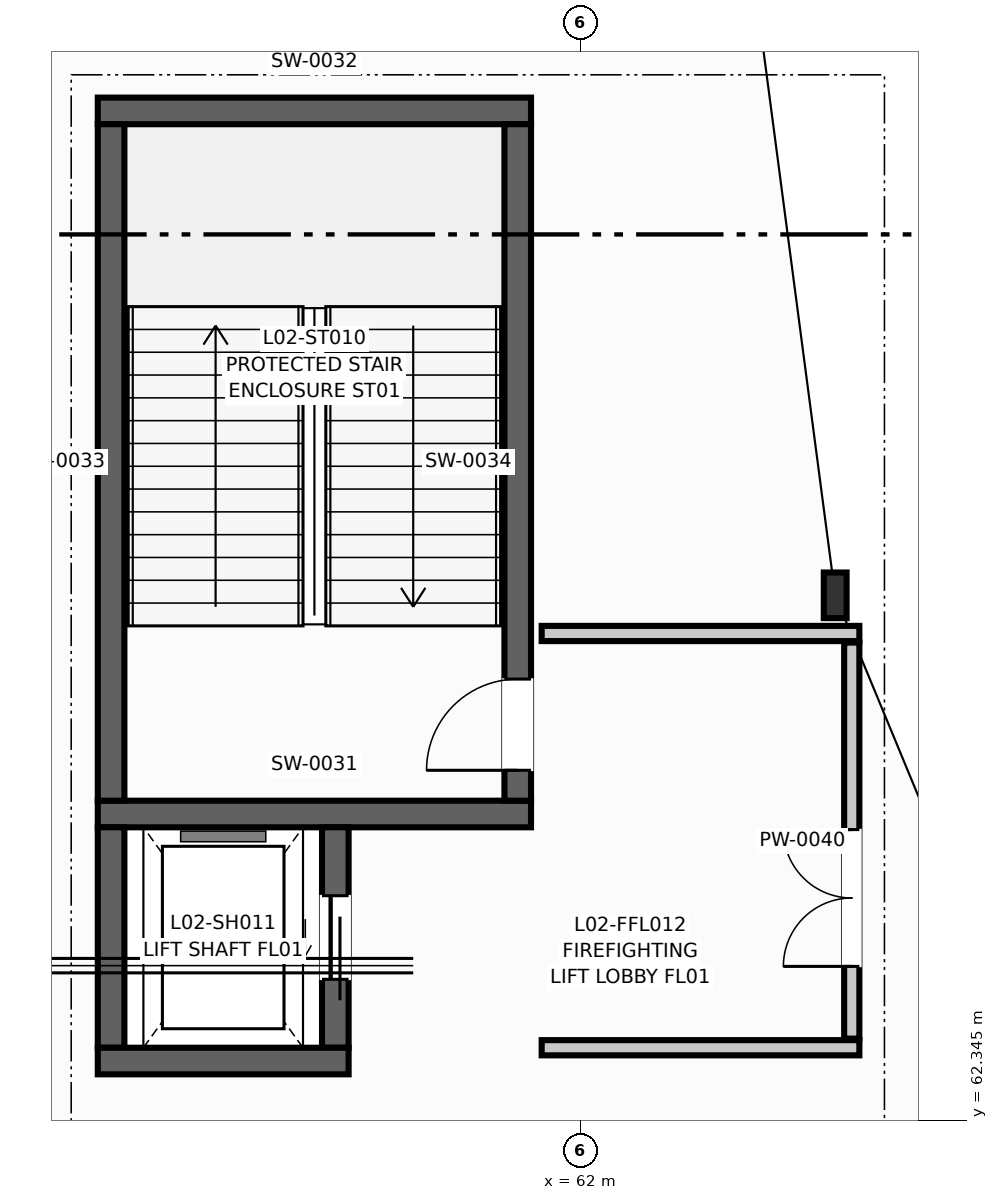
"""IFC4 building model, lengths in metres.
Left out: names, types, materials, properties, quantities, classifications, styles, units other than length and angle.
Written with IfcOpenShell. Run it as: python <this file> out.ifc"""

import sys

from ifc_helpers import new_model, si_unit, direction, frame, frame_2d, origin, origin_2d, place, context, subcontext, project, spatial, rectangle, i_section, extrude, element, fill, save


model = new_model("IFC4")
c1 = context("Model", 3, precision=1e-05, world=origin(), true_north=direction((0.0, 1.0)))
c2 = subcontext(c1, "Body", "Model", "MODEL_VIEW")
j1 = project(units=[si_unit("LENGTHUNIT", "METRE"), si_unit("PLANEANGLEUNIT", "RADIAN")], contexts=[c1])
p1 = place(None, origin())
s1 = spatial("IfcSite", under=j1, at=p1, CompositionType="ELEMENT")
p2 = place(p1, origin())
s2 = spatial("IfcBuilding", under=s1, at=p2, CompositionType="ELEMENT")
p3 = place(p2, frame((0.0, 0.0, 9.0)))
s3 = spatial("IfcBuildingStorey", under=s2, at=p3, CompositionType="ELEMENT", Elevation=9.0)
p4 = place(p3, frame((65.352, 69.252, 0.0), z_axis=(0.0, 0.0, 1.0), x_axis=(1.0, 0.0, 0.0)))
e1 = element("IfcColumn", 1, at=p4, inside=s3, PredefinedType="COLUMN", context=c2, shape_type="SweptSolid", body=[
    extrude(i_section(OverallWidth=0.3, OverallDepth=0.6, WebThickness=0.015, FlangeThickness=0.03, at=origin_2d()), origin(), (0.0, 0.0, 1.0), 4.5),
])
p5 = place(p3, frame((51.201, 65.46, 0.0), z_axis=(0.0, 0.0, 1.0), x_axis=(0.382681957383, -0.923880143468, 0.0)))
e2 = element("IfcWall", 2, at=p5, inside=s3, PredefinedType="SOLIDWALL", context=c2, shape_type="SweptSolid", body=[
    extrude(rectangle(XDim=12.648, YDim=0.28, at=frame_2d((6.324, 0.0))), origin(), (0.0, 0.0, 1.0), 3.1),
])
p6 = place(p5, frame((5.424, 0.0, 0.0)))
e3 = element("IfcOpeningElement", 3, at=p6, cuts=e2, PredefinedType="OPENING", context=c2, shape_type="SweptSolid", body=[
    extrude(rectangle(XDim=1.8, YDim=2.35, at=frame_2d((0.9, 1.175))), frame((0.0, 0.15, 0.0), z_axis=(0.0, -1.0, 0.0), x_axis=(1.0, 0.0, 0.0)), (0.0, 0.0, 1.0), 0.3),
])
for number, where, z_axis, x_axis in (
    (4, (55.65, 66.375, 0.0), (0.0, 0.0, 1.0), (1.0, 0.0, 0.0)),
    (5, (55.65, 75.625, 0.0), (0.0, 0.0, 1.0), (1.0, 0.0, 0.0)),
):
    element("IfcWall", number, at=place(p3, frame(where, z_axis=z_axis, x_axis=x_axis)), inside=s3, PredefinedType="SHEAR", context=c2, shape_type="SweptSolid", body=[
        extrude(rectangle(XDim=5.7, YDim=0.35, at=frame_2d((2.85, 0.0))), origin(), (0.0, 0.0, 1.0), 4.25),
    ])
p7 = place(p3, frame((55.825, 66.55, 0.0), z_axis=(0.0, 0.0, 1.0), x_axis=(0.0, 1.0, 0.0)))
e6 = element("IfcWall", 6, at=p7, inside=s3, PredefinedType="SHEAR", context=c2, shape_type="SweptSolid", body=[
    extrude(rectangle(XDim=8.9, YDim=0.35, at=frame_2d((4.45, 0.0))), origin(), (0.0, 0.0, 1.0), 4.25),
])
p8 = place(p3, frame((61.175, 66.55, 0.0), z_axis=(0.0, 0.0, 1.0), x_axis=(0.0, 1.0, 0.0)))
e7 = element("IfcWall", 7, at=p8, inside=s3, PredefinedType="SHEAR", context=c2, shape_type="SweptSolid", body=[
    extrude(rectangle(XDim=8.9, YDim=0.35, at=frame_2d((4.45, 0.0))), origin(), (0.0, 0.0, 1.0), 4.25),
])
p9 = place(p8, frame((0.4, 0.0, 0.0)))
e8 = element("IfcOpeningElement", 8, at=p9, cuts=e7, PredefinedType="OPENING", context=c2, shape_type="SweptSolid", body=[
    extrude(rectangle(XDim=1.2, YDim=2.2, at=frame_2d((0.6, 1.1))), frame((0.0, 0.185, 0.0), z_axis=(0.0, -1.0, 0.0), x_axis=(1.0, 0.0, 0.0)), (0.0, 0.0, 1.0), 0.37),
])
p10 = place(p3, frame((55.825, 63.3, 0.0), z_axis=(0.0, 0.0, 1.0), x_axis=(0.0, 1.0, 0.0)))
e9 = element("IfcWall", 9, at=p10, inside=s3, PredefinedType="SHEAR", context=c2, shape_type="SweptSolid", body=[
    extrude(rectangle(XDim=2.9, YDim=0.35, at=frame_2d((1.45, 0.0))), origin(), (0.0, 0.0, 1.0), 4.25),
])
p11 = place(p3, frame((58.775, 63.3, 0.0), z_axis=(0.0, 0.0, 1.0), x_axis=(0.0, 1.0, 0.0)))
e10 = element("IfcWall", 10, at=p11, inside=s3, PredefinedType="SHEAR", context=c2, shape_type="SweptSolid", body=[
    extrude(rectangle(XDim=2.9, YDim=0.35, at=frame_2d((1.45, 0.0))), origin(), (0.0, 0.0, 1.0), 4.25),
])
p12 = place(p11, frame((0.9, 0.0, 0.0)))
e11 = element("IfcOpeningElement", 11, at=p12, cuts=e10, PredefinedType="OPENING", context=c2, shape_type="SweptSolid", body=[
    extrude(rectangle(XDim=1.1, YDim=2.2, at=frame_2d((0.55, 1.1))), frame((0.0, 0.185, 0.0), z_axis=(0.0, -1.0, 0.0), x_axis=(1.0, 0.0, 0.0)), (0.0, 0.0, 1.0), 0.37),
])
p13 = place(p3, frame((55.65, 63.125, 0.0), z_axis=(0.0, 0.0, 1.0), x_axis=(1.0, 0.0, 0.0)))
e12 = element("IfcWall", 12, at=p13, inside=s3, PredefinedType="SHEAR", context=c2, shape_type="SweptSolid", body=[
    extrude(rectangle(XDim=3.3, YDim=0.35, at=frame_2d((1.65, 0.0))), origin(), (0.0, 0.0, 1.0), 4.25),
])
for number, where, z_axis, x_axis in (
    (13, (61.49, 63.3, 0.0), (0.0, 0.0, 1.0), (1.0, 0.0, 0.0)),
    (14, (61.49, 68.75, 0.0), (0.0, 0.0, 1.0), (1.0, 0.0, 0.0)),
):
    element("IfcWall", number, at=place(p3, frame(where, z_axis=z_axis, x_axis=x_axis)), inside=s3, PredefinedType="PARTITIONING", context=c2, shape_type="SweptSolid", body=[
        extrude(rectangle(XDim=4.18, YDim=0.2, at=frame_2d((2.09, 0.0))), origin(), (0.0, 0.0, 1.0), 3.22),
    ])
p14 = place(p3, frame((65.57, 63.42, 0.0), z_axis=(0.0, 0.0, 1.0), x_axis=(0.0, 1.0, 0.0)))
e15 = element("IfcWall", 15, at=p14, inside=s3, PredefinedType="PARTITIONING", context=c2, shape_type="SweptSolid", body=[
    extrude(rectangle(XDim=5.21, YDim=0.2, at=frame_2d((2.605, 0.0))), origin(), (0.0, 0.0, 1.0), 3.22),
])
p15 = place(p14, frame((0.95, 0.0, 0.0)))
e16 = element("IfcOpeningElement", 16, at=p15, cuts=e15, PredefinedType="OPENING", context=c2, shape_type="SweptSolid", body=[
    extrude(rectangle(XDim=1.8, YDim=2.2, at=frame_2d((0.9, 1.1))), frame((0.0, 0.11, 0.0), z_axis=(0.0, -1.0, 0.0), x_axis=(1.0, 0.0, 0.0)), (0.0, 0.0, 1.0), 0.22),
])
p16 = place(p9, origin())
e17 = element("IfcDoor", 17, at=p16, inside=s3, OperationType="SINGLE_SWING_LEFT", PredefinedType="DOOR", context=c2, shape_type="SweptSolid", body=[
    extrude(rectangle(XDim=1.2, YDim=2.2, at=frame_2d((0.6, 1.1))), frame((0.0, 0.025, 0.0), z_axis=(0.0, -1.0, 0.0), x_axis=(1.0, 0.0, 0.0)), (0.0, 0.0, 1.0), 0.05),
])
fill(e8, e17)
p17 = place(p12, origin())
e18 = element("IfcDoor", 18, at=p17, inside=s3, OperationType="SLIDING_TO_LEFT", PredefinedType="DOOR", context=c2, shape_type="SweptSolid", body=[
    extrude(rectangle(XDim=1.1, YDim=2.2, at=frame_2d((0.55, 1.1))), frame((0.0, 0.025, 0.0), z_axis=(0.0, -1.0, 0.0), x_axis=(1.0, 0.0, 0.0)), (0.0, 0.0, 1.0), 0.05),
])
fill(e11, e18)
p18 = place(p15, origin())
e19 = element("IfcDoor", 19, at=p18, inside=s3, OperationType="DOUBLE_DOOR_SINGLE_SWING", PredefinedType="DOOR", context=c2, shape_type="SweptSolid", body=[
    extrude(rectangle(XDim=1.8, YDim=2.2, at=frame_2d((0.9, 1.1))), frame((0.0, 0.025, 0.0), z_axis=(0.0, -1.0, 0.0), x_axis=(1.0, 0.0, 0.0)), (0.0, 0.0, 1.0), 0.05),
])
fill(e16, e19)
save(model, sys.argv[1])
